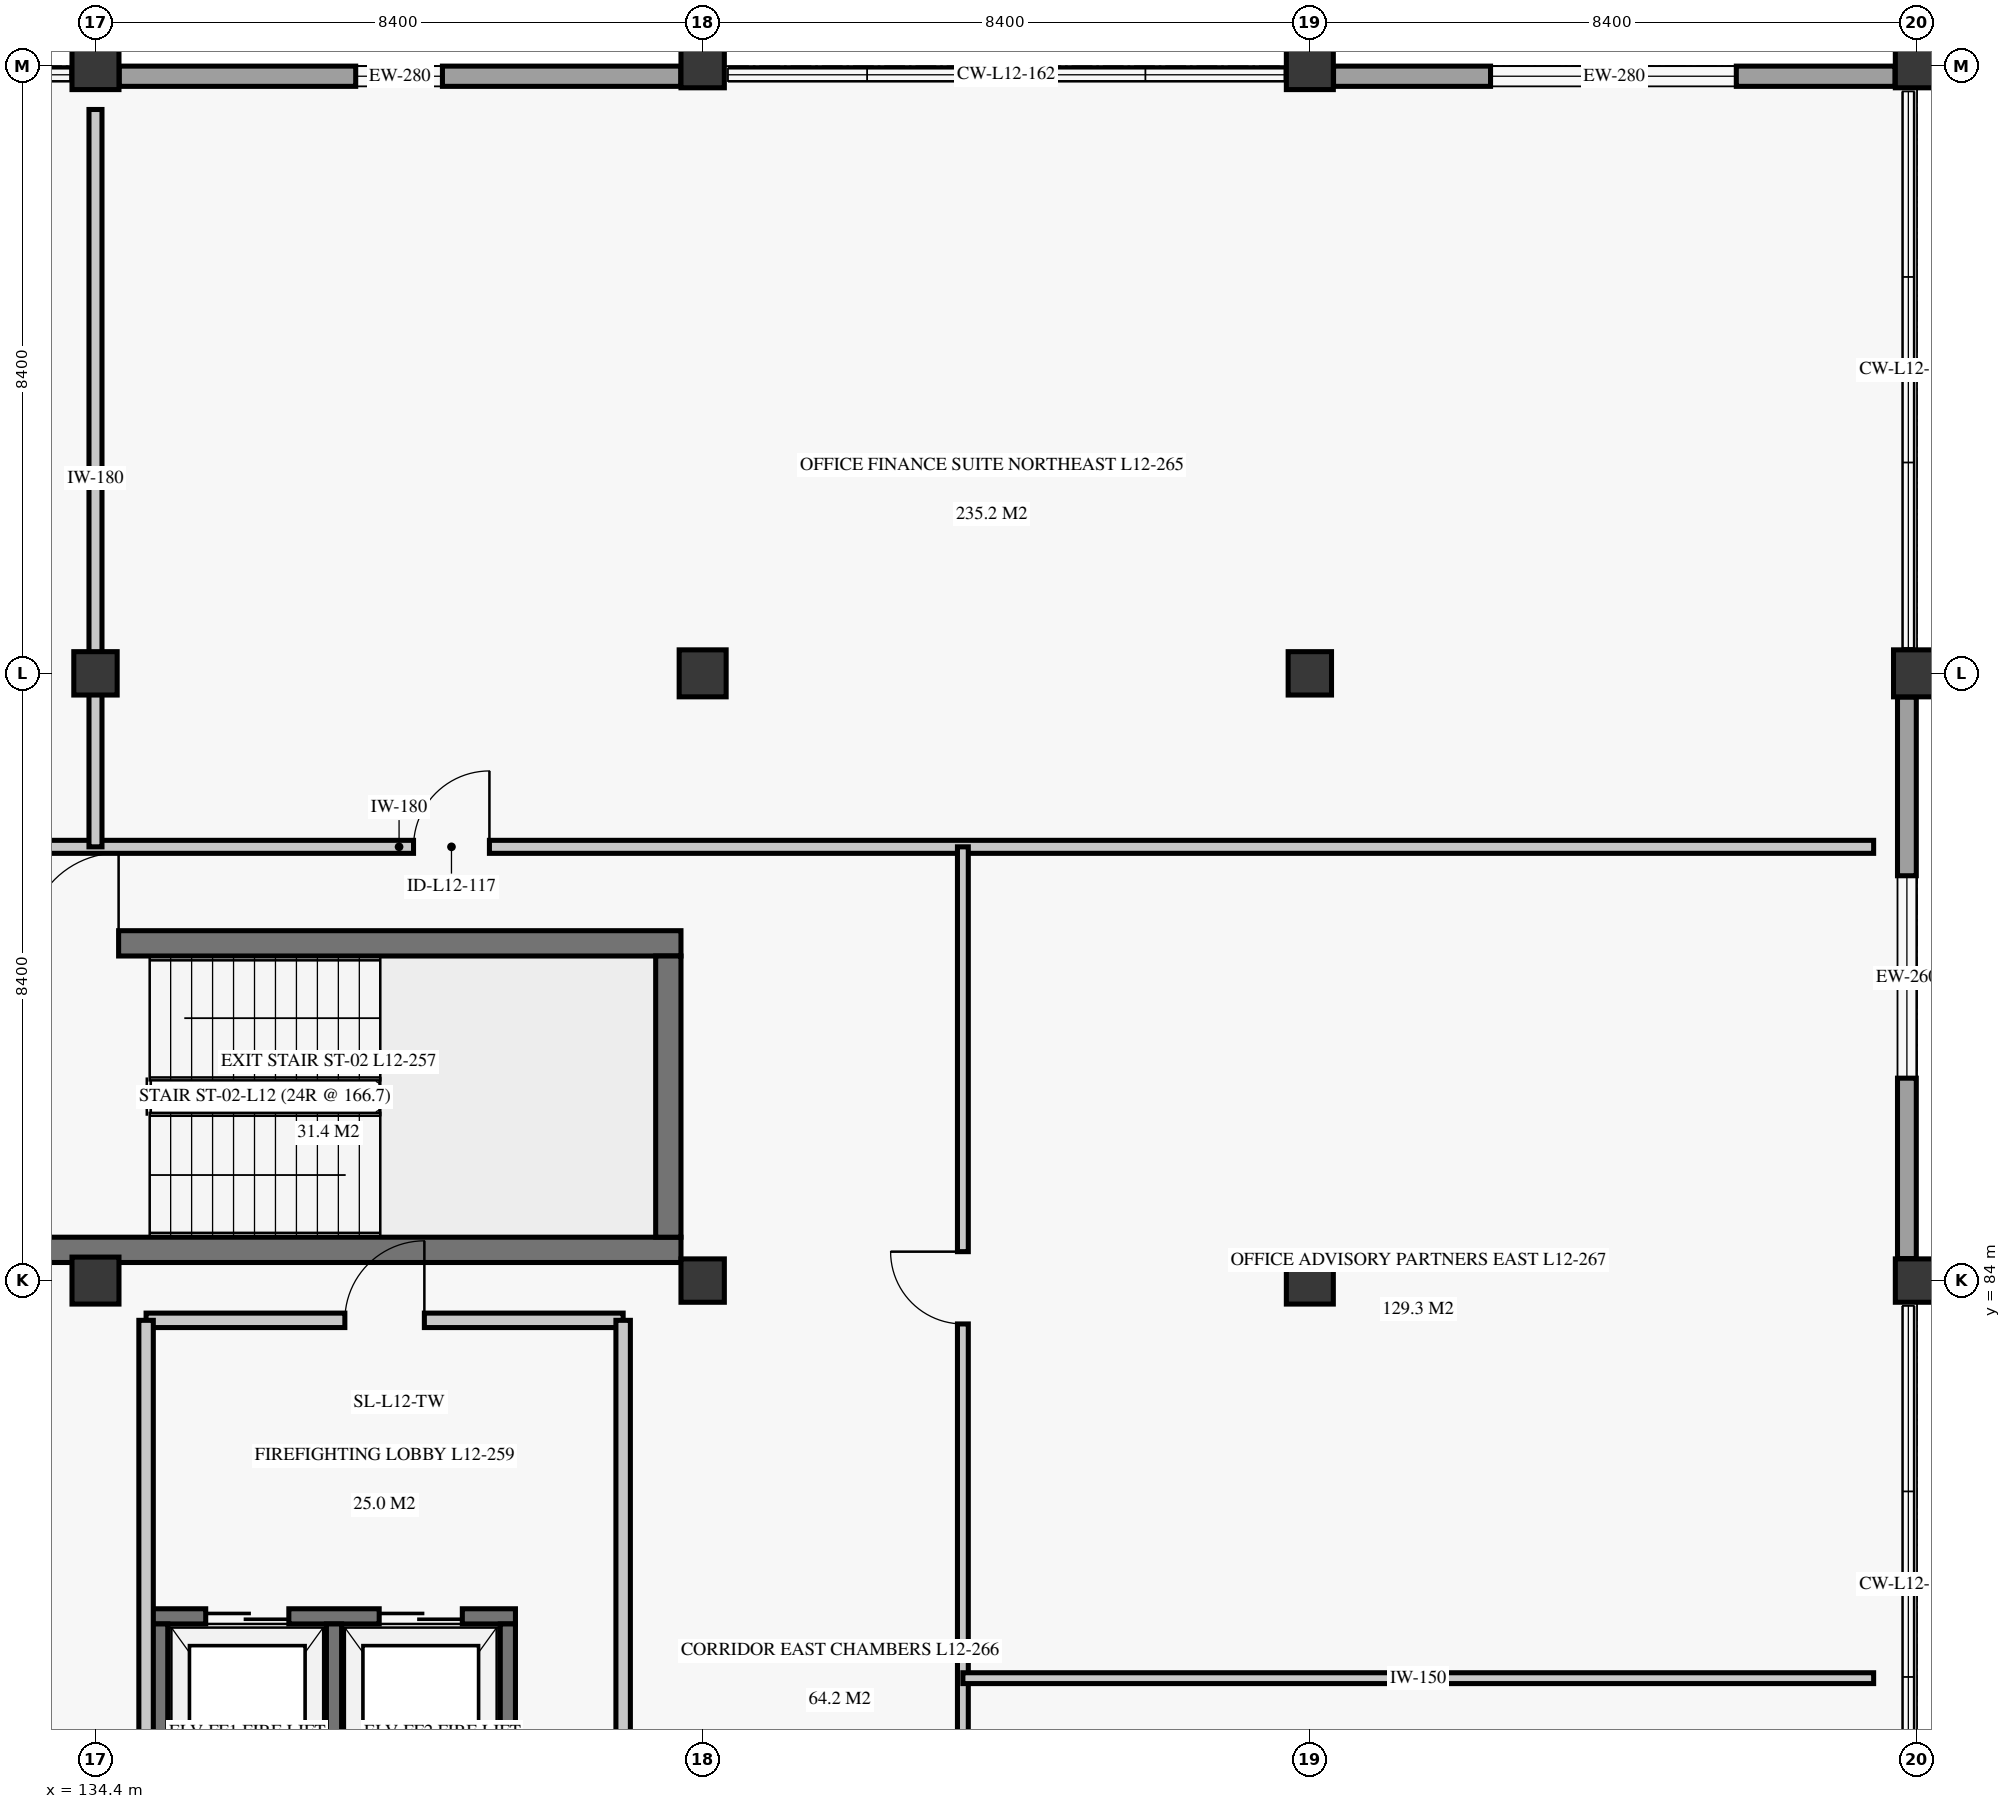
"""IFC4 building model, lengths in metres.
Left out: names, types, materials, properties, quantities, classifications, styles, units other than length and angle.
Written with IfcOpenShell. Run it as: python <this file> out.ifc"""

import sys

from ifc_helpers import new_model, si_unit, direction, frame, frame_2d, origin, origin_2d, place, context, subcontext, project, spatial, rectangle, extrude, element, fill, save


model = new_model("IFC4")
c1 = context("Model", 3, precision=1e-05, world=origin(), true_north=direction((0.0, 1.0)))
c2 = subcontext(c1, "Body", "Model", "MODEL_VIEW")
j1 = project(units=[si_unit("LENGTHUNIT", "METRE"), si_unit("PLANEANGLEUNIT", "RADIAN")], contexts=[c1])
p1 = place(None, origin())
s1 = spatial("IfcSite", under=j1, at=p1, CompositionType="ELEMENT")
p2 = place(p1, origin())
s2 = spatial("IfcBuilding", under=s1, at=p2, CompositionType="ELEMENT")
p3 = place(p2, frame((0.0, 0.0, 50.7)))
s3 = spatial("IfcBuildingStorey", under=s2, at=p3, CompositionType="ELEMENT", Elevation=50.7)
p4 = place(p3, frame((134.4, 84.0, 0.0), z_axis=(0.0, 0.0, 1.0), x_axis=(1.0, 0.0, 0.0)))
e1 = element("IfcColumn", 1, at=p4, inside=s3, PredefinedType="COLUMN", context=c2, shape_type="SweptSolid", body=[
    extrude(rectangle(XDim=0.65, YDim=0.65, at=origin_2d()), origin(), (0.0, 0.0, 1.0), 3.72),
])
p5 = place(p3, frame((134.4, 92.4, 0.0), z_axis=(0.0, 0.0, 1.0), x_axis=(1.0, 0.0, 0.0)))
e2 = element("IfcColumn", 2, at=p5, inside=s3, PredefinedType="COLUMN", context=c2, shape_type="SweptSolid", body=[
    extrude(rectangle(XDim=0.6, YDim=0.6, at=origin_2d()), origin(), (0.0, 0.0, 1.0), 3.72),
])
p6 = place(p3, frame((134.4, 100.8, 0.0), z_axis=(0.0, 0.0, 1.0), x_axis=(1.0, 0.0, 0.0)))
e3 = element("IfcColumn", 3, at=p6, inside=s3, PredefinedType="COLUMN", context=c2, shape_type="SweptSolid", body=[
    extrude(rectangle(XDim=0.65, YDim=0.65, at=origin_2d()), origin(), (0.0, 0.0, 1.0), 3.72),
])
p7 = place(p3, frame((142.8, 84.0, 0.0), z_axis=(0.0, 0.0, 1.0), x_axis=(1.0, 0.0, 0.0)))
e4 = element("IfcColumn", 4, at=p7, inside=s3, PredefinedType="COLUMN", context=c2, shape_type="SweptSolid", body=[
    extrude(rectangle(XDim=0.6, YDim=0.6, at=origin_2d()), origin(), (0.0, 0.0, 1.0), 3.72),
])
p8 = place(p3, frame((142.8, 92.4, 0.0), z_axis=(0.0, 0.0, 1.0), x_axis=(1.0, 0.0, 0.0)))
e5 = element("IfcColumn", 5, at=p8, inside=s3, PredefinedType="COLUMN", context=c2, shape_type="SweptSolid", body=[
    extrude(rectangle(XDim=0.65, YDim=0.65, at=origin_2d()), origin(), (0.0, 0.0, 1.0), 3.72),
])
p9 = place(p3, frame((142.8, 100.8, 0.0), z_axis=(0.0, 0.0, 1.0), x_axis=(1.0, 0.0, 0.0)))
e6 = element("IfcColumn", 6, at=p9, inside=s3, PredefinedType="COLUMN", context=c2, shape_type="SweptSolid", body=[
    extrude(rectangle(XDim=0.6, YDim=0.6, at=origin_2d()), origin(), (0.0, 0.0, 1.0), 3.72),
])
p10 = place(p3, frame((151.2, 84.0, 0.0), z_axis=(0.0, 0.0, 1.0), x_axis=(1.0, 0.0, 0.0)))
e7 = element("IfcColumn", 7, at=p10, inside=s3, PredefinedType="COLUMN", context=c2, shape_type="SweptSolid", body=[
    extrude(rectangle(XDim=0.65, YDim=0.65, at=origin_2d()), origin(), (0.0, 0.0, 1.0), 3.72),
])
p11 = place(p3, frame((151.2, 92.4, 0.0), z_axis=(0.0, 0.0, 1.0), x_axis=(1.0, 0.0, 0.0)))
e8 = element("IfcColumn", 8, at=p11, inside=s3, PredefinedType="COLUMN", context=c2, shape_type="SweptSolid", body=[
    extrude(rectangle(XDim=0.6, YDim=0.6, at=origin_2d()), origin(), (0.0, 0.0, 1.0), 3.72),
])
p12 = place(p3, frame((151.2, 100.8, 0.0), z_axis=(0.0, 0.0, 1.0), x_axis=(1.0, 0.0, 0.0)))
e9 = element("IfcColumn", 9, at=p12, inside=s3, PredefinedType="COLUMN", context=c2, shape_type="SweptSolid", body=[
    extrude(rectangle(XDim=0.65, YDim=0.65, at=origin_2d()), origin(), (0.0, 0.0, 1.0), 3.72),
])
p13 = place(p3, frame((159.6, 84.0, 0.0), z_axis=(0.0, 0.0, 1.0), x_axis=(1.0, 0.0, 0.0)))
e10 = element("IfcColumn", 10, at=p13, inside=s3, PredefinedType="COLUMN", context=c2, shape_type="SweptSolid", body=[
    extrude(rectangle(XDim=0.6, YDim=0.6, at=origin_2d()), origin(), (0.0, 0.0, 1.0), 3.72),
])
p14 = place(p3, frame((159.6, 92.4, 0.0), z_axis=(0.0, 0.0, 1.0), x_axis=(1.0, 0.0, 0.0)))
e11 = element("IfcColumn", 11, at=p14, inside=s3, PredefinedType="COLUMN", context=c2, shape_type="SweptSolid", body=[
    extrude(rectangle(XDim=0.65, YDim=0.65, at=origin_2d()), origin(), (0.0, 0.0, 1.0), 3.72),
])
p15 = place(p3, frame((159.6, 100.8, 0.0), z_axis=(0.0, 0.0, 1.0), x_axis=(1.0, 0.0, 0.0)))
e12 = element("IfcColumn", 12, at=p15, inside=s3, PredefinedType="COLUMN", context=c2, shape_type="SweptSolid", body=[
    extrude(rectangle(XDim=0.6, YDim=0.6, at=origin_2d()), origin(), (0.0, 0.0, 1.0), 3.72),
])
p16 = place(p3, frame((134.728, 100.66, 0.0), z_axis=(0.0, 0.0, 1.0), x_axis=(1.0, 0.0, 0.0)))
e13 = element("IfcWall", 13, at=p16, inside=s3, PredefinedType="SOLIDWALL", context=c2, shape_type="SweptSolid", body=[
    extrude(rectangle(XDim=7.77, YDim=0.28, at=frame_2d((3.885, 0.0))), origin(), (0.0, 0.0, 1.0), 3.04),
])
p17 = place(p16, frame((3.272, 0.0, 0.85)))
e14 = element("IfcOpeningElement", 14, at=p17, cuts=e13, PredefinedType="OPENING", context=c2, shape_type="SweptSolid", body=[
    extrude(rectangle(XDim=1.2, YDim=1.6, at=frame_2d((0.6, 0.8))), frame((0.0, 0.15, 0.0), z_axis=(0.0, -1.0, 0.0), x_axis=(1.0, 0.0, 0.0)), (0.0, 0.0, 1.0), 0.3),
])
p18 = place(p3, frame((151.528, 100.66, 0.0), z_axis=(0.0, 0.0, 1.0), x_axis=(1.0, 0.0, 0.0)))
e15 = element("IfcWall", 15, at=p18, inside=s3, PredefinedType="SOLIDWALL", context=c2, shape_type="SweptSolid", body=[
    extrude(rectangle(XDim=7.768, YDim=0.28, at=frame_2d((3.884, 0.0))), origin(), (0.0, 0.0, 1.0), 3.04),
])
p19 = place(p18, frame((2.172, 0.0, 0.85)))
e16 = element("IfcOpeningElement", 16, at=p19, cuts=e15, PredefinedType="OPENING", context=c2, shape_type="SweptSolid", body=[
    extrude(rectangle(XDim=3.4, YDim=1.9, at=frame_2d((1.7, 0.95))), frame((0.0, 0.15, 0.0), z_axis=(0.0, -1.0, 0.0), x_axis=(1.0, 0.0, 0.0)), (0.0, 0.0, 1.0), 0.3),
])
p20 = place(p3, frame((159.46, 84.304, 0.0), z_axis=(0.0, 0.0, 1.0), x_axis=(0.0, 1.0, 0.0)))
e17 = element("IfcWall", 17, at=p20, inside=s3, PredefinedType="SOLIDWALL", context=c2, shape_type="SweptSolid", body=[
    extrude(rectangle(XDim=7.768, YDim=0.26, at=frame_2d((3.884, 0.0))), origin(), (0.0, 0.0, 1.0), 3.04),
])
p21 = place(p20, frame((2.496, 0.0, 0.85)))
e18 = element("IfcOpeningElement", 18, at=p21, cuts=e17, PredefinedType="OPENING", context=c2, shape_type="SweptSolid", body=[
    extrude(rectangle(XDim=2.8, YDim=1.85, at=frame_2d((1.4, 0.925))), frame((0.0, 0.14, 0.0), z_axis=(0.0, -1.0, 0.0), x_axis=(1.0, 0.0, 0.0)), (0.0, 0.0, 1.0), 0.28),
])
p22 = place(p3, frame((132.75, 84.425, 0.0), z_axis=(0.0, 0.0, 1.0), x_axis=(1.0, 0.0, 0.0)))
e19 = element("IfcWall", 19, at=p22, inside=s3, PredefinedType="SHEAR", context=c2, shape_type="SweptSolid", body=[
    extrude(rectangle(XDim=9.75, YDim=0.35, at=frame_2d((4.875, 0.0))), origin(), (0.0, 0.0, 1.0), 3.72),
])
p23 = place(p3, frame((132.75, 88.665, 0.0), z_axis=(0.0, 0.0, 1.0), x_axis=(1.0, 0.0, 0.0)))
e20 = element("IfcWall", 20, at=p23, inside=s3, PredefinedType="SHEAR", context=c2, shape_type="SweptSolid", body=[
    extrude(rectangle(XDim=9.75, YDim=0.35, at=frame_2d((4.875, 0.0))), origin(), (0.0, 0.0, 1.0), 3.72),
])
p24 = place(p23, frame((0.72, 0.0, 0.0)))
e21 = element("IfcOpeningElement", 21, at=p24, cuts=e20, PredefinedType="OPENING", context=c2, shape_type="SweptSolid", body=[
    extrude(rectangle(XDim=1.25, YDim=2.2, at=frame_2d((0.625, 1.1))), frame((0.0, 0.185, 0.0), z_axis=(0.0, -1.0, 0.0), x_axis=(1.0, 0.0, 0.0)), (0.0, 0.0, 1.0), 0.37),
])
p25 = place(p3, frame((142.325, 84.6, 0.0), z_axis=(0.0, 0.0, 1.0), x_axis=(0.0, 1.0, 0.0)))
e22 = element("IfcWall", 22, at=p25, inside=s3, PredefinedType="SHEAR", context=c2, shape_type="SweptSolid", body=[
    extrude(rectangle(XDim=3.89, YDim=0.35, at=frame_2d((1.945, 0.0))), origin(), (0.0, 0.0, 1.0), 3.72),
])
p26 = place(p3, frame((135.19, 79.355, 0.0), z_axis=(0.0, 0.0, 1.0), x_axis=(1.0, 0.0, 0.0)))
e23 = element("IfcWall", 23, at=p26, inside=s3, PredefinedType="SHEAR", context=c2, shape_type="SweptSolid", body=[
    extrude(rectangle(XDim=5.02, YDim=0.21, at=frame_2d((2.51, 0.0))), origin(), (0.0, 0.0, 1.0), 3.72),
])
p27 = place(p26, frame((0.735, 0.0, 0.0)))
e24 = element("IfcOpeningElement", 24, at=p27, cuts=e23, PredefinedType="OPENING", context=c2, shape_type="SweptSolid", body=[
    extrude(rectangle(XDim=1.15, YDim=2.2, at=frame_2d((0.575, 1.1))), frame((0.0, 0.115, 0.0), z_axis=(0.0, -1.0, 0.0), x_axis=(1.0, 0.0, 0.0)), (0.0, 0.0, 1.0), 0.23),
])
p28 = place(p26, frame((3.135, 0.0, 0.0)))
e25 = element("IfcOpeningElement", 25, at=p28, cuts=e23, PredefinedType="OPENING", context=c2, shape_type="SweptSolid", body=[
    extrude(rectangle(XDim=1.15, YDim=2.2, at=frame_2d((0.575, 1.1))), frame((0.0, 0.115, 0.0), z_axis=(0.0, -1.0, 0.0), x_axis=(1.0, 0.0, 0.0)), (0.0, 0.0, 1.0), 0.23),
])
for number, where, z_axis, x_axis in (
    (26, (135.295, 76.25, 0.0), (0.0, 0.0, 1.0), (0.0, 1.0, 0.0)),
    (27, (140.105, 76.25, 0.0), (0.0, 0.0, 1.0), (0.0, 1.0, 0.0)),
    (28, (137.7, 76.25, 0.0), (0.0, 0.0, 1.0), (0.0, 1.0, 0.0)),
):
    element("IfcWall", number, at=place(p3, frame(where, z_axis=z_axis, x_axis=x_axis)), inside=s3, PredefinedType="SHEAR", context=c2, shape_type="SweptSolid", body=[
        extrude(rectangle(XDim=3.0, YDim=0.21, at=frame_2d((1.5, 0.0))), origin(), (0.0, 0.0, 1.0), 3.72),
    ])
p29 = place(p3, frame((135.1, 83.45, 0.0), z_axis=(0.0, 0.0, 1.0), x_axis=(1.0, 0.0, 0.0)))
e29 = element("IfcWall", 29, at=p29, inside=s3, PredefinedType="PARTITIONING", context=c2, shape_type="SweptSolid", body=[
    extrude(rectangle(XDim=6.6, YDim=0.2, at=frame_2d((3.3, 0.0))), origin(), (0.0, 0.0, 1.0), 3.34),
])
p30 = place(p29, frame((2.75, 0.0, 0.0)))
e30 = element("IfcOpeningElement", 30, at=p30, cuts=e29, PredefinedType="OPENING", context=c2, shape_type="SweptSolid", body=[
    extrude(rectangle(XDim=1.1, YDim=2.2, at=frame_2d((0.55, 1.1))), frame((0.0, 0.11, 0.0), z_axis=(0.0, -1.0, 0.0), x_axis=(1.0, 0.0, 0.0)), (0.0, 0.0, 1.0), 0.22),
])
for number, where, z_axis, x_axis in (
    (31, (135.1, 76.2, 0.0), (0.0, 0.0, 1.0), (0.0, 1.0, 0.0)),
    (32, (141.7, 76.2, 0.0), (0.0, 0.0, 1.0), (0.0, 1.0, 0.0)),
):
    element("IfcWall", number, at=place(p3, frame(where, z_axis=z_axis, x_axis=x_axis)), inside=s3, PredefinedType="PARTITIONING", context=c2, shape_type="SweptSolid", body=[
        extrude(rectangle(XDim=7.25, YDim=0.2, at=frame_2d((3.625, 0.0))), origin(), (0.0, 0.0, 1.0), 3.34),
    ])
p31 = place(p3, frame((118.2, 90.0, 0.0), z_axis=(0.0, 0.0, 1.0), x_axis=(1.0, 0.0, 0.0)))
e33 = element("IfcWall", 33, at=p31, inside=s3, PredefinedType="PARTITIONING", context=c2, shape_type="SweptSolid", body=[
    extrude(rectangle(XDim=40.8, YDim=0.18, at=frame_2d((20.4, 0.0))), origin(), (0.0, 0.0, 1.0), 3.34),
])
p32 = place(p31, frame((3.2, 0.0, 0.0)))
e34 = element("IfcOpeningElement", 34, at=p32, cuts=e33, PredefinedType="OPENING", context=c2, shape_type="SweptSolid", body=[
    extrude(rectangle(XDim=1.05, YDim=2.2, at=frame_2d((0.525, 1.1))), frame((0.0, 0.1, 0.0), z_axis=(0.0, -1.0, 0.0), x_axis=(1.0, 0.0, 0.0)), (0.0, 0.0, 1.0), 0.2),
])
p33 = place(p31, frame((20.6, 0.0, 0.0)))
e35 = element("IfcOpeningElement", 35, at=p33, cuts=e33, PredefinedType="OPENING", context=c2, shape_type="SweptSolid", body=[
    extrude(rectangle(XDim=1.05, YDim=2.2, at=frame_2d((0.525, 1.1))), frame((0.0, 0.1, 0.0), z_axis=(0.0, -1.0, 0.0), x_axis=(1.0, 0.0, 0.0)), (0.0, 0.0, 1.0), 0.2),
])
p34 = place(p3, frame((134.4, 90.0, 0.0), z_axis=(0.0, 0.0, 1.0), x_axis=(0.0, 1.0, 0.0)))
e36 = element("IfcWall", 36, at=p34, inside=s3, PredefinedType="PARTITIONING", context=c2, shape_type="SweptSolid", body=[
    extrude(rectangle(XDim=10.2, YDim=0.18, at=frame_2d((5.1, 0.0))), origin(), (0.0, 0.0, 1.0), 3.34),
])
p35 = place(p3, frame((146.4, 67.8, 0.0), z_axis=(0.0, 0.0, 1.0), x_axis=(0.0, 1.0, 0.0)))
e37 = element("IfcWall", 37, at=p35, inside=s3, PredefinedType="PARTITIONING", context=c2, shape_type="SweptSolid", body=[
    extrude(rectangle(XDim=22.2, YDim=0.15, at=frame_2d((11.1, 0.0))), origin(), (0.0, 0.0, 1.0), 3.34),
])
p36 = place(p35, frame((4.2, 0.0, 0.0)))
e38 = element("IfcOpeningElement", 38, at=p36, cuts=e37, PredefinedType="OPENING", context=c2, shape_type="SweptSolid", body=[
    extrude(rectangle(XDim=1.0, YDim=2.1, at=frame_2d((0.5, 1.05))), frame((0.0, 0.085, 0.0), z_axis=(0.0, -1.0, 0.0), x_axis=(1.0, 0.0, 0.0)), (0.0, 0.0, 1.0), 0.17),
])
p37 = place(p35, frame((15.6, 0.0, 0.0)))
e39 = element("IfcOpeningElement", 39, at=p37, cuts=e37, PredefinedType="OPENING", context=c2, shape_type="SweptSolid", body=[
    extrude(rectangle(XDim=1.0, YDim=2.1, at=frame_2d((0.5, 1.05))), frame((0.0, 0.085, 0.0), z_axis=(0.0, -1.0, 0.0), x_axis=(1.0, 0.0, 0.0)), (0.0, 0.0, 1.0), 0.17),
])
p38 = place(p3, frame((146.4, 78.5, 0.0), z_axis=(0.0, 0.0, 1.0), x_axis=(1.0, 0.0, 0.0)))
e40 = element("IfcWall", 40, at=p38, inside=s3, PredefinedType="PARTITIONING", context=c2, shape_type="SweptSolid", body=[
    extrude(rectangle(XDim=12.6, YDim=0.15, at=frame_2d((6.3, 0.0))), origin(), (0.0, 0.0, 1.0), 3.34),
])
p39 = place(p17, origin())
e41 = element("IfcWindow", 41, at=p39, inside=s3, PartitioningType="SINGLE_PANEL", PredefinedType="WINDOW", context=c2, shape_type="SweptSolid", body=[
    extrude(rectangle(XDim=1.2, YDim=1.6, at=frame_2d((0.6, 0.8))), frame((0.0, 0.03, 0.0), z_axis=(0.0, -1.0, 0.0), x_axis=(1.0, 0.0, 0.0)), (0.0, 0.0, 1.0), 0.06),
])
fill(e14, e41)
p40 = place(p19, origin())
e42 = element("IfcWindow", 42, at=p40, inside=s3, PartitioningType="SINGLE_PANEL", PredefinedType="WINDOW", context=c2, shape_type="SweptSolid", body=[
    extrude(rectangle(XDim=3.4, YDim=1.9, at=frame_2d((1.7, 0.95))), frame((0.0, 0.03, 0.0), z_axis=(0.0, -1.0, 0.0), x_axis=(1.0, 0.0, 0.0)), (0.0, 0.0, 1.0), 0.06),
])
fill(e16, e42)
p41 = place(p21, origin())
e43 = element("IfcWindow", 43, at=p41, inside=s3, PartitioningType="SINGLE_PANEL", PredefinedType="WINDOW", context=c2, shape_type="SweptSolid", body=[
    extrude(rectangle(XDim=2.8, YDim=1.85, at=frame_2d((1.4, 0.925))), frame((0.0, 0.03, 0.0), z_axis=(0.0, -1.0, 0.0), x_axis=(1.0, 0.0, 0.0)), (0.0, 0.0, 1.0), 0.06),
])
fill(e18, e43)
p42 = place(p24, origin())
e44 = element("IfcDoor", 44, at=p42, inside=s3, OperationType="SINGLE_SWING_RIGHT", PredefinedType="DOOR", context=c2, shape_type="SweptSolid", body=[
    extrude(rectangle(XDim=1.25, YDim=2.2, at=frame_2d((0.625, 1.1))), frame((0.0, 0.025, 0.0), z_axis=(0.0, -1.0, 0.0), x_axis=(1.0, 0.0, 0.0)), (0.0, 0.0, 1.0), 0.05),
])
fill(e21, e44)
p43 = place(p27, origin())
e45 = element("IfcDoor", 45, at=p43, inside=s3, OperationType="DOUBLE_DOOR_SLIDING", PredefinedType="DOOR", context=c2, shape_type="SweptSolid", body=[
    extrude(rectangle(XDim=1.15, YDim=2.2, at=frame_2d((0.575, 1.1))), frame((0.0, 0.025, 0.0), z_axis=(0.0, -1.0, 0.0), x_axis=(1.0, 0.0, 0.0)), (0.0, 0.0, 1.0), 0.05),
])
fill(e24, e45)
p44 = place(p28, origin())
e46 = element("IfcDoor", 46, at=p44, inside=s3, OperationType="DOUBLE_DOOR_SLIDING", PredefinedType="DOOR", context=c2, shape_type="SweptSolid", body=[
    extrude(rectangle(XDim=1.15, YDim=2.2, at=frame_2d((0.575, 1.1))), frame((0.0, 0.025, 0.0), z_axis=(0.0, -1.0, 0.0), x_axis=(1.0, 0.0, 0.0)), (0.0, 0.0, 1.0), 0.05),
])
fill(e25, e46)
p45 = place(p30, origin())
e47 = element("IfcDoor", 47, at=p45, inside=s3, OperationType="SINGLE_SWING_RIGHT", PredefinedType="DOOR", context=c2, shape_type="SweptSolid", body=[
    extrude(rectangle(XDim=1.1, YDim=2.2, at=frame_2d((0.55, 1.1))), frame((0.0, 0.025, 0.0), z_axis=(0.0, -1.0, 0.0), x_axis=(1.0, 0.0, 0.0)), (0.0, 0.0, 1.0), 0.05),
])
fill(e30, e47)
p46 = place(p33, origin())
e48 = element("IfcDoor", 48, at=p46, inside=s3, OperationType="SINGLE_SWING_RIGHT", PredefinedType="DOOR", context=c2, shape_type="SweptSolid", body=[
    extrude(rectangle(XDim=1.05, YDim=2.2, at=frame_2d((0.525, 1.1))), frame((0.0, 0.025, 0.0), z_axis=(0.0, -1.0, 0.0), x_axis=(1.0, 0.0, 0.0)), (0.0, 0.0, 1.0), 0.05),
])
fill(e35, e48)
p47 = place(p37, origin())
e49 = element("IfcDoor", 49, at=p47, inside=s3, OperationType="SINGLE_SWING_RIGHT", PredefinedType="DOOR", context=c2, shape_type="SweptSolid", body=[
    extrude(rectangle(XDim=1.0, YDim=2.1, at=frame_2d((0.5, 1.05))), frame((0.0, 0.025, 0.0), z_axis=(0.0, -1.0, 0.0), x_axis=(1.0, 0.0, 0.0)), (0.0, 0.0, 1.0), 0.05),
])
fill(e39, e49)
save(model, sys.argv[1])
